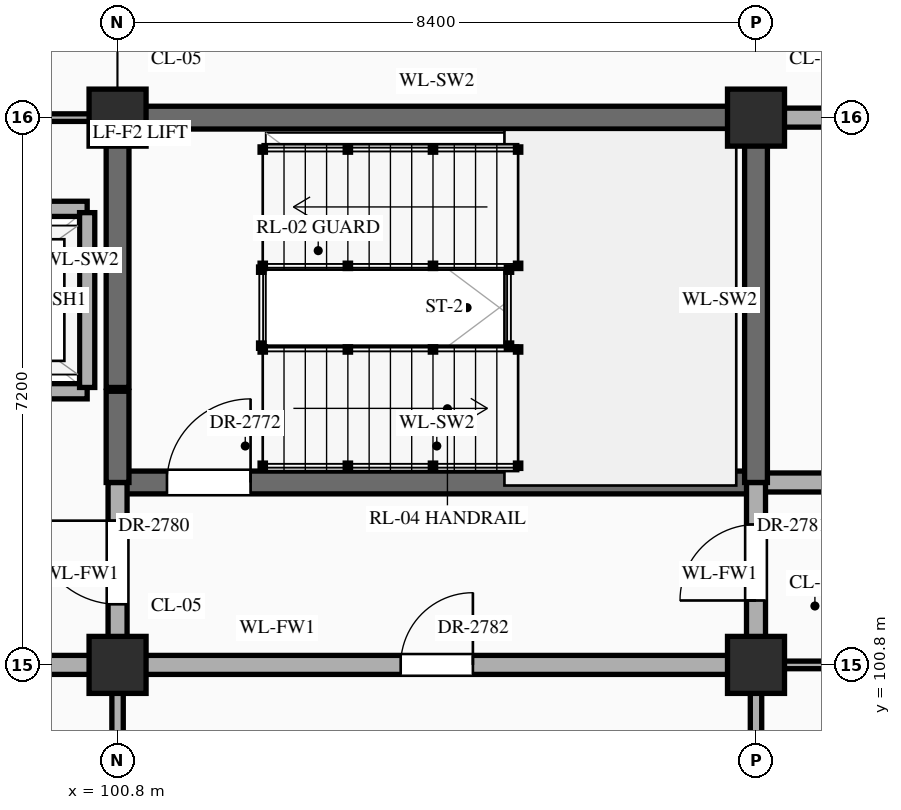
"""IFC4 building model, lengths in metres.
Left out: names, types, materials, properties, quantities, classifications, styles, units other than length and angle.
Written with IfcOpenShell. Run it as: python <this file> out.ifc"""

import sys

from ifc_helpers import new_model, si_unit, direction, frame, frame_2d, origin, origin_2d, place, context, subcontext, project, spatial, rectangle, extrude, element, fill, save


model = new_model("IFC4")
c1 = context("Model", 3, precision=1e-05, world=origin(), true_north=direction((0.0, 1.0)))
c2 = subcontext(c1, "Body", "Model", "MODEL_VIEW")
j1 = project(units=[si_unit("LENGTHUNIT", "METRE"), si_unit("PLANEANGLEUNIT", "RADIAN")], contexts=[c1])
p1 = place(None, origin())
s1 = spatial("IfcSite", under=j1, at=p1, CompositionType="ELEMENT")
p2 = place(p1, origin())
s2 = spatial("IfcBuilding", under=s1, at=p2, CompositionType="ELEMENT")
p3 = place(p2, frame((0.0, 0.0, 43.5)))
s3 = spatial("IfcBuildingStorey", under=s2, at=p3, CompositionType="ELEMENT", Elevation=43.5)
for number, where, z_axis, x_axis in (
    (1, (100.8, 100.8, 0.0), (0.0, 0.0, 1.0), (1.0, 0.0, 0.0)),
    (2, (100.8, 108.0, 0.0), (0.0, 0.0, 1.0), (1.0, 0.0, 0.0)),
    (3, (109.2, 100.8, 0.0), (0.0, 0.0, 1.0), (1.0, 0.0, 0.0)),
    (4, (109.2, 108.0, 0.0), (0.0, 0.0, 1.0), (1.0, 0.0, 0.0)),
):
    element("IfcColumn", number, at=place(p3, frame(where, z_axis=z_axis, x_axis=x_axis)), inside=s3, PredefinedType="COLUMN", context=c2, shape_type="SweptSolid", body=[
        extrude(rectangle(XDim=0.75, YDim=0.75, at=origin_2d()), origin(), (0.0, 0.0, 1.0), 4.2),
    ])
p4 = place(p3, frame((96.6, 100.8, 0.0), z_axis=(0.0, 0.0, 1.0), x_axis=(1.0, 0.0, 0.0)))
e5 = element("IfcWall", 5, at=p4, inside=s3, PredefinedType="STANDARD", context=c2, shape_type="SweptSolid", body=[
    extrude(rectangle(XDim=12.6, YDim=0.25, at=frame_2d((6.3, 0.0))), origin(), (0.0, 0.0, 1.0), 3.1),
])
p5 = place(p4, frame((7.925, 0.0, 0.0)))
e6 = element("IfcOpeningElement", 6, at=p5, cuts=e5, PredefinedType="OPENING", context=c2, shape_type="SweptSolid", body=[
    extrude(rectangle(XDim=0.95, YDim=2.15, at=frame_2d((0.475, 1.075))), frame((0.0, 0.137, 0.0), z_axis=(0.0, -1.0, 0.0), x_axis=(1.0, 0.0, 0.0)), (0.0, 0.0, 1.0), 0.274),
])
p6 = place(p3, frame((109.2, 100.8, 0.0), z_axis=(0.0, 0.0, 1.0), x_axis=(1.0, 0.0, 0.0)))
e7 = element("IfcWall", 7, at=p6, inside=s3, PredefinedType="STANDARD", context=c2, shape_type="SweptSolid", body=[
    extrude(rectangle(XDim=3.4, YDim=0.1, at=frame_2d((1.7, 0.0))), origin(), (0.0, 0.0, 1.0), 3.1),
])
p7 = place(p6, frame((1.417, 0.0, 0.0)))
e8 = element("IfcOpeningElement", 8, at=p7, cuts=e7, PredefinedType="OPENING", context=c2, shape_type="SweptSolid", body=[
    extrude(rectangle(XDim=0.86, YDim=2.1, at=frame_2d((0.43, 1.05))), frame((0.0, 0.062, 0.0), z_axis=(0.0, -1.0, 0.0), x_axis=(1.0, 0.0, 0.0)), (0.0, 0.0, 1.0), 0.124),
])
p8 = place(p3, frame((100.8, 103.2, 0.0), z_axis=(0.0, 0.0, 1.0), x_axis=(1.0, 0.0, 0.0)))
e9 = element("IfcWall", 9, at=p8, inside=s3, PredefinedType="SHEAR", context=c2, shape_type="SweptSolid", body=[
    extrude(rectangle(XDim=8.4, YDim=0.3, at=frame_2d((4.2, 0.0))), origin(), (0.0, 0.0, 1.0), 3.95),
])
p9 = place(p8, frame((0.65, 0.0, 0.0)))
e10 = element("IfcOpeningElement", 10, at=p9, cuts=e9, PredefinedType="OPENING", context=c2, shape_type="SweptSolid", body=[
    extrude(rectangle(XDim=1.1, YDim=2.2, at=frame_2d((0.55, 1.1))), frame((0.0, 0.162, 0.0), z_axis=(0.0, -1.0, 0.0), x_axis=(1.0, 0.0, 0.0)), (0.0, 0.0, 1.0), 0.324),
])
p10 = place(p3, frame((109.2, 103.2, 0.0), z_axis=(0.0, 0.0, 1.0), x_axis=(1.0, 0.0, 0.0)))
e11 = element("IfcWall", 11, at=p10, inside=s3, PredefinedType="STANDARD", context=c2, shape_type="SweptSolid", body=[
    extrude(rectangle(XDim=4.2, YDim=0.25, at=frame_2d((2.1, 0.0))), origin(), (0.0, 0.0, 1.0), 3.95),
])
p11 = place(p10, frame((1.55, 0.0, 0.0)))
e12 = element("IfcOpeningElement", 12, at=p11, cuts=e11, PredefinedType="OPENING", context=c2, shape_type="SweptSolid", body=[
    extrude(rectangle(XDim=1.1, YDim=2.2, at=frame_2d((0.55, 1.1))), frame((0.0, 0.137, 0.0), z_axis=(0.0, -1.0, 0.0), x_axis=(1.0, 0.0, 0.0)), (0.0, 0.0, 1.0), 0.274),
])
p12 = place(p3, frame((97.4, 104.4, 0.0), z_axis=(0.0, 0.0, 1.0), x_axis=(1.0, 0.0, 0.0)))
e13 = element("IfcWall", 13, at=p12, inside=s3, PredefinedType="STANDARD", context=c2, shape_type="SweptSolid", body=[
    extrude(rectangle(XDim=3.0, YDim=0.2, at=frame_2d((1.5, 0.0))), origin(), (0.0, 0.0, 1.0), 3.95),
])
p13 = place(p12, frame((0.9, 0.0, 0.0)))
e14 = element("IfcOpeningElement", 14, at=p13, cuts=e13, PredefinedType="OPENING", context=c2, shape_type="SweptSolid", body=[
    extrude(rectangle(XDim=1.2, YDim=2.15, at=frame_2d((0.6, 1.075))), frame((0.0, 0.112, 0.0), z_axis=(0.0, -1.0, 0.0), x_axis=(1.0, 0.0, 0.0)), (0.0, 0.0, 1.0), 0.224),
])
p14 = place(p3, frame((97.4, 106.8, 0.0), z_axis=(0.0, 0.0, 1.0), x_axis=(1.0, 0.0, 0.0)))
e15 = element("IfcWall", 15, at=p14, inside=s3, PredefinedType="STANDARD", context=c2, shape_type="SweptSolid", body=[
    extrude(rectangle(XDim=3.0, YDim=0.2, at=frame_2d((1.5, 0.0))), origin(), (0.0, 0.0, 1.0), 3.95),
])
p15 = place(p3, frame((96.65, 108.0, 0.0), z_axis=(0.0, 0.0, 1.0), x_axis=(1.0, 0.0, 0.0)))
e16 = element("IfcWall", 16, at=p15, inside=s3, PredefinedType="STANDARD", context=c2, shape_type="SweptSolid", body=[
    extrude(rectangle(XDim=4.1, YDim=0.1, at=frame_2d((2.05, 0.0))), origin(), (0.0, 0.0, 1.0), 3.1),
])
p16 = place(p3, frame((100.8, 108.0, 0.0), z_axis=(0.0, 0.0, 1.0), x_axis=(1.0, 0.0, 0.0)))
e17 = element("IfcWall", 17, at=p16, inside=s3, PredefinedType="SHEAR", context=c2, shape_type="SweptSolid", body=[
    extrude(rectangle(XDim=8.4, YDim=0.3, at=frame_2d((4.2, 0.0))), origin(), (0.0, 0.0, 1.0), 3.95),
])
p17 = place(p3, frame((109.2, 108.0, 0.0), z_axis=(0.0, 0.0, 1.0), x_axis=(1.0, 0.0, 0.0)))
e18 = element("IfcWall", 18, at=p17, inside=s3, PredefinedType="STANDARD", context=c2, shape_type="SweptSolid", body=[
    extrude(rectangle(XDim=4.2, YDim=0.25, at=frame_2d((2.1, 0.0))), origin(), (0.0, 0.0, 1.0), 3.1),
])
p18 = place(p17, frame((1.698, 0.0, 0.0)))
e19 = element("IfcOpeningElement", 19, at=p18, cuts=e18, PredefinedType="OPENING", context=c2, shape_type="SweptSolid", body=[
    extrude(rectangle(XDim=1.1, YDim=2.2, at=frame_2d((0.55, 1.1))), frame((0.0, 0.137, 0.0), z_axis=(0.0, -1.0, 0.0), x_axis=(1.0, 0.0, 0.0)), (0.0, 0.0, 1.0), 0.274),
])
p19 = place(p3, frame((100.4, 104.45, 0.0), z_axis=(0.0, 0.0, 1.0), x_axis=(0.0, 1.0, 0.0)))
e20 = element("IfcWall", 20, at=p19, inside=s3, PredefinedType="STANDARD", context=c2, shape_type="SweptSolid", body=[
    extrude(rectangle(XDim=2.3, YDim=0.2, at=frame_2d((1.15, 0.0))), origin(), (0.0, 0.0, 1.0), 3.95),
])
p20 = place(p3, frame((100.8, 96.0, 0.0), z_axis=(0.0, 0.0, 1.0), x_axis=(0.0, 1.0, 0.0)))
e21 = element("IfcWall", 21, at=p20, inside=s3, PredefinedType="STANDARD", context=c2, shape_type="SweptSolid", body=[
    extrude(rectangle(XDim=4.8, YDim=0.15, at=frame_2d((2.4, 0.0))), origin(), (0.0, 0.0, 1.0), 3.2),
])
p21 = place(p3, frame((100.8, 100.8, 0.0), z_axis=(0.0, 0.0, 1.0), x_axis=(0.0, 1.0, 0.0)))
e22 = element("IfcWall", 22, at=p21, inside=s3, PredefinedType="STANDARD", context=c2, shape_type="SweptSolid", body=[
    extrude(rectangle(XDim=2.4, YDim=0.25, at=frame_2d((1.2, 0.0))), origin(), (0.0, 0.0, 1.0), 3.2),
])
p22 = place(p21, frame((0.798, 0.0, 0.0)))
e23 = element("IfcOpeningElement", 23, at=p22, cuts=e22, PredefinedType="OPENING", context=c2, shape_type="SweptSolid", body=[
    extrude(rectangle(XDim=1.1, YDim=2.2, at=frame_2d((0.55, 1.1))), frame((0.0, 0.137, 0.0), z_axis=(0.0, -1.0, 0.0), x_axis=(1.0, 0.0, 0.0)), (0.0, 0.0, 1.0), 0.274),
])
p23 = place(p3, frame((100.8, 103.2, 0.0), z_axis=(0.0, 0.0, 1.0), x_axis=(0.0, 1.0, 0.0)))
e24 = element("IfcWall", 24, at=p23, inside=s3, PredefinedType="SHEAR", context=c2, shape_type="SweptSolid", body=[
    extrude(rectangle(XDim=1.2, YDim=0.3, at=frame_2d((0.6, 0.0))), origin(), (0.0, 0.0, 1.0), 3.95),
])
p24 = place(p3, frame((100.8, 104.45, 0.0), z_axis=(0.0, 0.0, 1.0), x_axis=(0.0, 1.0, 0.0)))
e25 = element("IfcWall", 25, at=p24, inside=s3, PredefinedType="SHEAR", context=c2, shape_type="SweptSolid", body=[
    extrude(rectangle(XDim=3.5, YDim=0.3, at=frame_2d((1.75, 0.0))), origin(), (0.0, 0.0, 1.0), 3.95),
])
p25 = place(p3, frame((109.2, 96.0, 0.0), z_axis=(0.0, 0.0, 1.0), x_axis=(0.0, 1.0, 0.0)))
e26 = element("IfcWall", 26, at=p25, inside=s3, PredefinedType="STANDARD", context=c2, shape_type="SweptSolid", body=[
    extrude(rectangle(XDim=4.8, YDim=0.15, at=frame_2d((2.4, 0.0))), origin(), (0.0, 0.0, 1.0), 3.2),
])
p26 = place(p3, frame((109.2, 100.8, 0.0), z_axis=(0.0, 0.0, 1.0), x_axis=(0.0, 1.0, 0.0)))
e27 = element("IfcWall", 27, at=p26, inside=s3, PredefinedType="STANDARD", context=c2, shape_type="SweptSolid", body=[
    extrude(rectangle(XDim=2.4, YDim=0.25, at=frame_2d((1.2, 0.0))), origin(), (0.0, 0.0, 1.0), 3.2),
])
p27 = place(p26, frame((0.847, 0.0, 0.0)))
e28 = element("IfcOpeningElement", 28, at=p27, cuts=e27, PredefinedType="OPENING", context=c2, shape_type="SweptSolid", body=[
    extrude(rectangle(XDim=1.0, YDim=2.2, at=frame_2d((0.5, 1.1))), frame((0.0, 0.137, 0.0), z_axis=(0.0, -1.0, 0.0), x_axis=(1.0, 0.0, 0.0)), (0.0, 0.0, 1.0), 0.274),
])
p28 = place(p3, frame((109.2, 103.2, 0.0), z_axis=(0.0, 0.0, 1.0), x_axis=(0.0, 1.0, 0.0)))
e29 = element("IfcWall", 29, at=p28, inside=s3, PredefinedType="SHEAR", context=c2, shape_type="SweptSolid", body=[
    extrude(rectangle(XDim=4.8, YDim=0.3, at=frame_2d((2.4, 0.0))), origin(), (0.0, 0.0, 1.0), 3.95),
])
p29 = place(p9, origin())
e30 = element("IfcDoor", 30, at=p29, inside=s3, OperationType="SINGLE_SWING_RIGHT", PredefinedType="DOOR", context=c2, shape_type="SweptSolid", body=[
    extrude(rectangle(XDim=1.1, YDim=2.2, at=frame_2d((0.55, 1.1))), frame((0.0, 0.025, 0.0), z_axis=(0.0, -1.0, 0.0), x_axis=(1.0, 0.0, 0.0)), (0.0, 0.0, 1.0), 0.05),
])
fill(e10, e30)
p30 = place(p22, origin())
e31 = element("IfcDoor", 31, at=p30, inside=s3, OperationType="SINGLE_SWING_RIGHT", PredefinedType="DOOR", context=c2, shape_type="SweptSolid", body=[
    extrude(rectangle(XDim=1.1, YDim=2.2, at=frame_2d((0.55, 1.1))), frame((0.0, 0.025, 0.0), z_axis=(0.0, -1.0, 0.0), x_axis=(1.0, 0.0, 0.0)), (0.0, 0.0, 1.0), 0.05),
])
fill(e23, e31)
p31 = place(p27, origin())
e32 = element("IfcDoor", 32, at=p31, inside=s3, OperationType="SINGLE_SWING_LEFT", PredefinedType="DOOR", context=c2, shape_type="SweptSolid", body=[
    extrude(rectangle(XDim=1.0, YDim=2.2, at=frame_2d((0.5, 1.1))), frame((0.0, 0.025, 0.0), z_axis=(0.0, -1.0, 0.0), x_axis=(1.0, 0.0, 0.0)), (0.0, 0.0, 1.0), 0.05),
])
fill(e28, e32)
p32 = place(p5, origin())
e33 = element("IfcDoor", 33, at=p32, inside=s3, OperationType="SINGLE_SWING_RIGHT", PredefinedType="DOOR", context=c2, shape_type="SweptSolid", body=[
    extrude(rectangle(XDim=0.95, YDim=2.15, at=frame_2d((0.475, 1.075))), frame((0.0, 0.025, 0.0), z_axis=(0.0, -1.0, 0.0), x_axis=(1.0, 0.0, 0.0)), (0.0, 0.0, 1.0), 0.05),
])
fill(e6, e33)
save(model, sys.argv[1])
